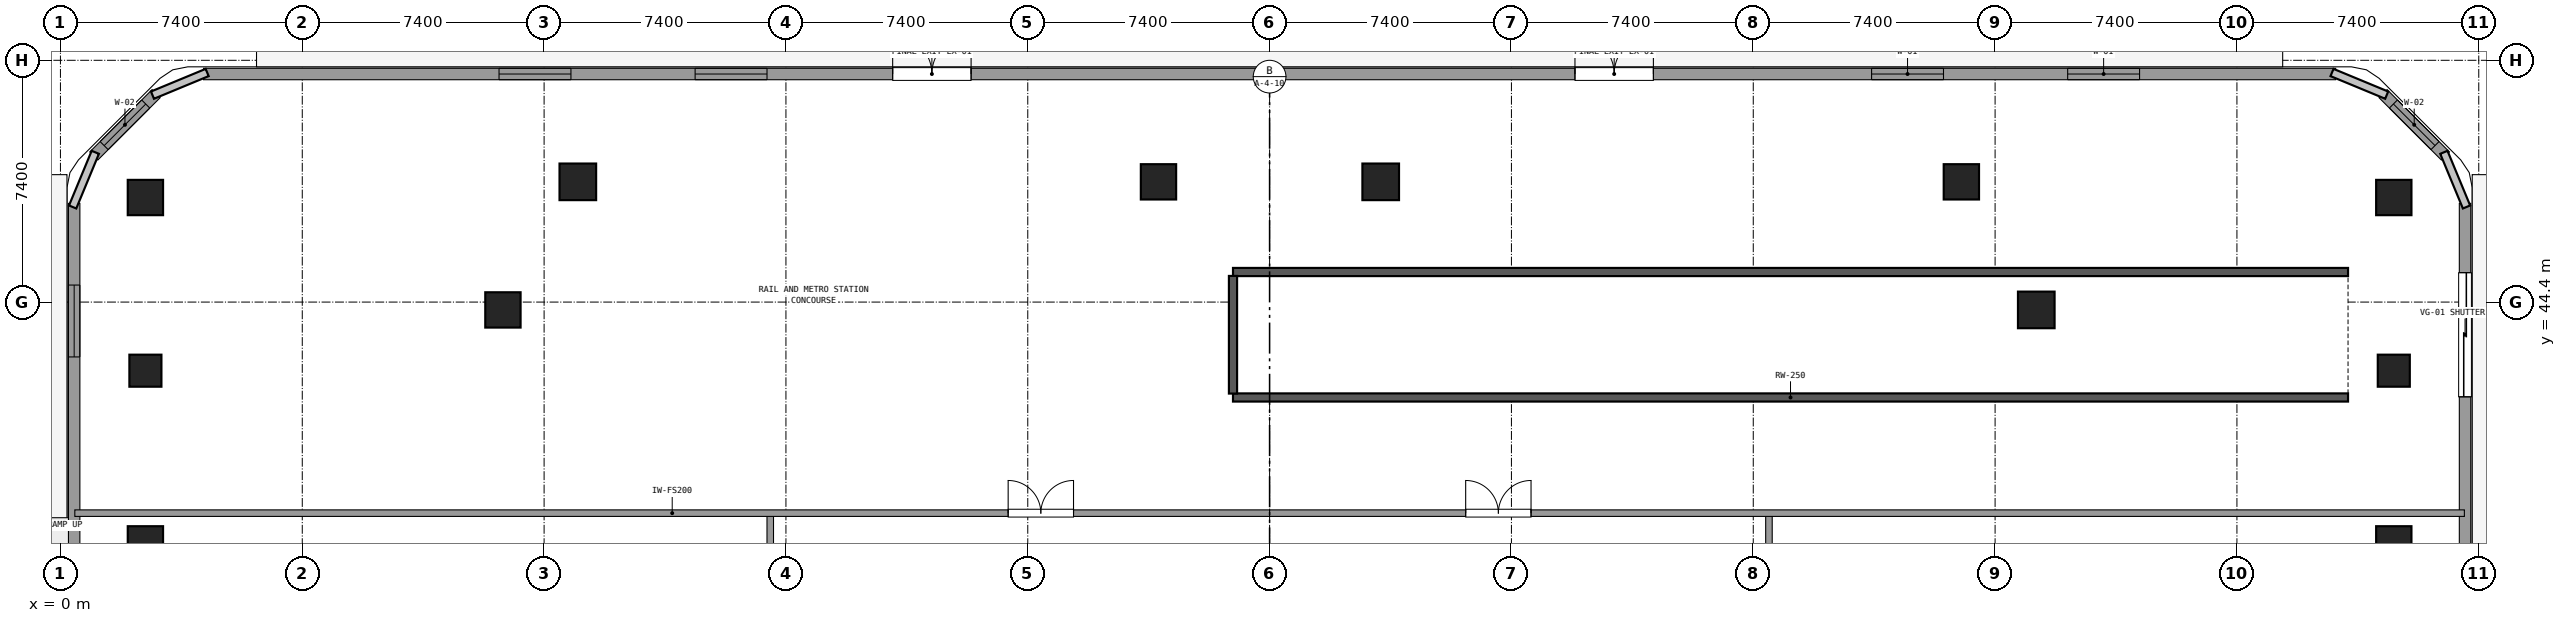
"""IFC4 building model, lengths in metres.
Left out: names, types, materials, properties, quantities, classifications, styles, units other than length and angle.
Written with IfcOpenShell. Run it as: python <this file> out.ifc"""

import sys

from ifc_helpers import new_model, si_unit, direction, frame, frame_2d, origin, origin_2d, place, context, subcontext, project, spatial, rectangle, circle, extrude, element, fill, save


model = new_model("IFC4")
c1 = context("Model", 3, precision=1e-05, world=origin(), true_north=direction((0.0, 1.0)))
c2 = subcontext(c1, "Body", "Model", "MODEL_VIEW")
j1 = project(units=[si_unit("LENGTHUNIT", "METRE"), si_unit("PLANEANGLEUNIT", "RADIAN")], contexts=[c1])
p1 = place(None, origin())
s1 = spatial("IfcSite", under=j1, at=p1, CompositionType="ELEMENT")
p2 = place(p1, origin())
s2 = spatial("IfcBuilding", under=s1, at=p2, CompositionType="ELEMENT")
p3 = place(p2, origin())
s3 = spatial("IfcBuildingStorey", under=s2, at=p3, CompositionType="ELEMENT", Elevation=0.0)
p4 = place(p3, frame((60.46, 44.16, 0.0), z_axis=(0.0, 0.0, 1.0), x_axis=(1.0, 0.0, 0.0)))
e1 = element("IfcColumn", 1, at=p4, inside=s3, PredefinedType="COLUMN", context=c2, shape_type="SweptSolid", body=[
    extrude(circle(Radius=0.56, at=origin_2d()), origin(), (0.0, 0.0, 1.0), 5.4),
])
p5 = place(p3, frame((58.168, 48.08, 0.0), z_axis=(0.0, 0.0, 1.0), x_axis=(1.0, 0.0, 0.0)))
e2 = element("IfcColumn", 2, at=p5, inside=s3, PredefinedType="COLUMN", context=c2, shape_type="SweptSolid", body=[
    extrude(rectangle(XDim=1.08, YDim=1.08, at=origin_2d()), origin(), (0.0, 0.0, 1.0), 5.4),
])
p6 = place(p3, frame((40.4, 48.08, 0.0), z_axis=(0.0, 0.0, 1.0), x_axis=(1.0, 0.0, 0.0)))
e3 = element("IfcColumn", 3, at=p6, inside=s3, PredefinedType="COLUMN", context=c2, shape_type="SweptSolid", body=[
    extrude(circle(Radius=0.56, at=origin_2d()), origin(), (0.0, 0.0, 1.0), 5.4),
])
p7 = place(p3, frame((33.6, 48.08, 0.0), z_axis=(0.0, 0.0, 1.0), x_axis=(1.0, 0.0, 0.0)))
e4 = element("IfcColumn", 4, at=p7, inside=s3, PredefinedType="COLUMN", context=c2, shape_type="SweptSolid", body=[
    extrude(rectangle(XDim=1.08, YDim=1.08, at=origin_2d()), origin(), (0.0, 0.0, 1.0), 5.4),
])
p8 = place(p3, frame((15.832, 48.08, 0.0), z_axis=(0.0, 0.0, 1.0), x_axis=(1.0, 0.0, 0.0)))
e5 = element("IfcColumn", 5, at=p8, inside=s3, PredefinedType="COLUMN", context=c2, shape_type="SweptSolid", body=[
    extrude(circle(Radius=0.56, at=origin_2d()), origin(), (0.0, 0.0, 1.0), 5.4),
])
for number, where, z_axis, x_axis in (
    (6, (13.54, 44.16, 0.0), (0.0, 0.0, 1.0), (1.0, 0.0, 0.0)),
    (7, (2.6, 37.0, 0.0), (0.0, 0.0, 1.0), (1.0, 0.0, 0.0)),
    (8, (2.6, 47.6, 0.0), (0.0, 0.0, 1.0), (1.0, 0.0, 0.0)),
    (9, (71.4, 37.0, 0.0), (0.0, 0.0, 1.0), (1.0, 0.0, 0.0)),
    (10, (71.4, 47.6, 0.0), (0.0, 0.0, 1.0), (1.0, 0.0, 0.0)),
):
    element("IfcColumn", number, at=place(p3, frame(where, z_axis=z_axis, x_axis=x_axis)), inside=s3, PredefinedType="COLUMN", context=c2, shape_type="SweptSolid", body=[
        extrude(rectangle(XDim=1.08, YDim=1.08, at=origin_2d()), origin(), (0.0, 0.0, 1.0), 5.4),
    ])
for number, where, z_axis, x_axis in (
    (11, (2.6, 42.3, 0.0), (0.0, 0.0, 1.0), (1.0, 0.0, 0.0)),
    (12, (71.4, 42.3, 0.0), (0.0, 0.0, 1.0), (1.0, 0.0, 0.0)),
):
    element("IfcColumn", number, at=place(p3, frame(where, z_axis=z_axis, x_axis=x_axis)), inside=s3, PredefinedType="PILASTER", context=c2, shape_type="SweptSolid", body=[
        extrude(circle(Radius=0.49, at=origin_2d()), origin(), (0.0, 0.0, 1.0), 5.4),
    ])
for number, where, z_axis, x_axis in (
    (13, (35.88, 41.48, 0.0), (0.0, 0.0, 1.0), (1.0, 0.0, 0.0)),
    (14, (35.88, 45.32, 0.0), (0.0, 0.0, 1.0), (1.0, 0.0, 0.0)),
):
    element("IfcWall", number, at=place(p3, frame(where, z_axis=z_axis, x_axis=x_axis)), inside=s3, PredefinedType="SOLIDWALL", context=c2, shape_type="SweptSolid", body=[
        extrude(rectangle(XDim=34.12, YDim=0.25, at=frame_2d((17.06, 0.0))), origin(), (0.0, 0.0, 1.0), 5.1),
    ])
p9 = place(p3, frame((35.88, 41.6, 0.0), z_axis=(0.0, 0.0, 1.0), x_axis=(0.0, 1.0, 0.0)))
e15 = element("IfcWall", 15, at=p9, inside=s3, PredefinedType="SOLIDWALL", context=c2, shape_type="SweptSolid", body=[
    extrude(rectangle(XDim=3.6, YDim=0.25, at=frame_2d((1.8, 0.0))), origin(), (0.0, 0.0, 1.0), 5.1),
])
p10 = place(p3, frame((73.58, 4.379, 0.0), z_axis=(0.0, 0.0, 1.0), x_axis=(0.0, 1.0, 0.0)))
e16 = element("IfcWall", 16, at=p10, inside=s3, PredefinedType="SOLIDWALL", context=c2, shape_type="SweptSolid", body=[
    extrude(rectangle(XDim=43.042, YDim=0.35, at=frame_2d((21.521, 0.0))), origin(), (0.0, 0.0, 1.0), 4.14),
])
p11 = place(p10, frame((14.071, 0.0, 0.0)))
e17 = element("IfcOpeningElement", 17, at=p11, cuts=e16, PredefinedType="OPENING", context=c2, shape_type="SweptSolid", body=[
    extrude(rectangle(XDim=2.1, YDim=2.4, at=frame_2d((1.05, 1.2))), frame((0.0, 0.185, 0.0), z_axis=(0.0, -1.0, 0.0), x_axis=(1.0, 0.0, 0.0)), (0.0, 0.0, 1.0), 0.37),
])
p12 = place(p10, frame((37.121, 0.0, 0.0)))
e18 = element("IfcOpeningElement", 18, at=p12, cuts=e16, PredefinedType="OPENING", context=c2, shape_type="SweptSolid", body=[
    extrude(rectangle(XDim=3.8, YDim=2.85, at=frame_2d((1.9, 1.425))), frame((0.0, 0.185, 0.0), z_axis=(0.0, -1.0, 0.0), x_axis=(1.0, 0.0, 0.0)), (0.0, 0.0, 1.0), 0.37),
])
p13 = place(p3, frame((72.979, 48.872, 0.0), z_axis=(0.0, 0.0, 1.0), x_axis=(-0.707106781187, 0.707106781187, 0.0)))
e19 = element("IfcWall", 19, at=p13, inside=s3, PredefinedType="SOLIDWALL", context=c2, shape_type="SweptSolid", body=[
    extrude(rectangle(XDim=2.697, YDim=0.35, at=frame_2d((1.348, 0.0))), origin(), (0.0, 0.0, 1.0), 4.14),
])
p14 = place(p13, frame((0.449, 0.0, 1.15)))
e20 = element("IfcOpeningElement", 20, at=p14, cuts=e19, PredefinedType="OPENING", context=c2, shape_type="SweptSolid", body=[
    extrude(rectangle(XDim=1.8, YDim=1.75, at=frame_2d((0.9, 0.875))), frame((0.0, 0.185, 0.0), z_axis=(0.0, -1.0, 0.0), x_axis=(1.0, 0.0, 0.0)), (0.0, 0.0, 1.0), 0.37),
])
p15 = place(p3, frame((69.621, 51.38, 0.0), z_axis=(0.0, 0.0, 1.0), x_axis=(-1.0, 0.0, 0.0)))
e21 = element("IfcWall", 21, at=p15, inside=s3, PredefinedType="SOLIDWALL", context=c2, shape_type="SweptSolid", body=[
    extrude(rectangle(XDim=65.242, YDim=0.35, at=frame_2d((32.621, 0.0))), origin(), (0.0, 0.0, 1.0), 4.14),
])
p16 = place(p15, frame((20.877, 0.0, 0.0)))
e22 = element("IfcOpeningElement", 22, at=p16, cuts=e21, PredefinedType="OPENING", context=c2, shape_type="SweptSolid", body=[
    extrude(rectangle(XDim=2.4, YDim=2.5, at=frame_2d((1.2, 1.25))), frame((0.0, 0.185, 0.0), z_axis=(0.0, -1.0, 0.0), x_axis=(1.0, 0.0, 0.0)), (0.0, 0.0, 1.0), 0.37),
])
p17 = place(p15, frame((41.755, 0.0, 0.0)))
e23 = element("IfcOpeningElement", 23, at=p17, cuts=e21, PredefinedType="OPENING", context=c2, shape_type="SweptSolid", body=[
    extrude(rectangle(XDim=2.4, YDim=2.5, at=frame_2d((1.2, 1.25))), frame((0.0, 0.185, 0.0), z_axis=(0.0, -1.0, 0.0), x_axis=(1.0, 0.0, 0.0)), (0.0, 0.0, 1.0), 0.37),
])
p18 = place(p15, frame((6.0, 0.0, 1.2)))
e24 = element("IfcOpeningElement", 24, at=p18, cuts=e21, PredefinedType="OPENING", context=c2, shape_type="SweptSolid", body=[
    extrude(rectangle(XDim=2.2, YDim=1.6, at=frame_2d((1.1, 0.8))), frame((0.0, 0.185, 0.0), z_axis=(0.0, -1.0, 0.0), x_axis=(1.0, 0.0, 0.0)), (0.0, 0.0, 1.0), 0.37),
])
p19 = place(p15, frame((12.0, 0.0, 1.2)))
e25 = element("IfcOpeningElement", 25, at=p19, cuts=e21, PredefinedType="OPENING", context=c2, shape_type="SweptSolid", body=[
    extrude(rectangle(XDim=2.2, YDim=1.6, at=frame_2d((1.1, 0.8))), frame((0.0, 0.185, 0.0), z_axis=(0.0, -1.0, 0.0), x_axis=(1.0, 0.0, 0.0)), (0.0, 0.0, 1.0), 0.37),
])
p20 = place(p15, frame((48.0, 0.0, 1.2)))
e26 = element("IfcOpeningElement", 26, at=p20, cuts=e21, PredefinedType="OPENING", context=c2, shape_type="SweptSolid", body=[
    extrude(rectangle(XDim=2.2, YDim=1.6, at=frame_2d((1.1, 0.8))), frame((0.0, 0.185, 0.0), z_axis=(0.0, -1.0, 0.0), x_axis=(1.0, 0.0, 0.0)), (0.0, 0.0, 1.0), 0.37),
])
p21 = place(p15, frame((54.0, 0.0, 1.2)))
e27 = element("IfcOpeningElement", 27, at=p21, cuts=e21, PredefinedType="OPENING", context=c2, shape_type="SweptSolid", body=[
    extrude(rectangle(XDim=2.2, YDim=1.6, at=frame_2d((1.1, 0.8))), frame((0.0, 0.185, 0.0), z_axis=(0.0, -1.0, 0.0), x_axis=(1.0, 0.0, 0.0)), (0.0, 0.0, 1.0), 0.37),
])
p22 = place(p3, frame((2.928, 50.779, 0.0), z_axis=(0.0, 0.0, 1.0), x_axis=(-0.707106781187, -0.707106781187, 0.0)))
e28 = element("IfcWall", 28, at=p22, inside=s3, PredefinedType="SOLIDWALL", context=c2, shape_type="SweptSolid", body=[
    extrude(rectangle(XDim=2.697, YDim=0.35, at=frame_2d((1.348, 0.0))), origin(), (0.0, 0.0, 1.0), 4.14),
])
p23 = place(p22, frame((0.449, 0.0, 1.15)))
e29 = element("IfcOpeningElement", 29, at=p23, cuts=e28, PredefinedType="OPENING", context=c2, shape_type="SweptSolid", body=[
    extrude(rectangle(XDim=1.8, YDim=1.75, at=frame_2d((0.9, 0.875))), frame((0.0, 0.185, 0.0), z_axis=(0.0, -1.0, 0.0), x_axis=(1.0, 0.0, 0.0)), (0.0, 0.0, 1.0), 0.37),
])
p24 = place(p3, frame((0.42, 47.421, 0.0), z_axis=(0.0, 0.0, 1.0), x_axis=(0.0, -1.0, 0.0)))
e30 = element("IfcWall", 30, at=p24, inside=s3, PredefinedType="SOLIDWALL", context=c2, shape_type="SweptSolid", body=[
    extrude(rectangle(XDim=43.042, YDim=0.35, at=frame_2d((21.521, 0.0))), origin(), (0.0, 0.0, 1.0), 4.14),
])
p25 = place(p24, frame((26.871, 0.0, 0.0)))
e31 = element("IfcOpeningElement", 31, at=p25, cuts=e30, PredefinedType="OPENING", context=c2, shape_type="SweptSolid", body=[
    extrude(rectangle(XDim=2.4, YDim=2.5, at=frame_2d((1.2, 1.25))), frame((0.0, 0.185, 0.0), z_axis=(0.0, -1.0, 0.0), x_axis=(1.0, 0.0, 0.0)), (0.0, 0.0, 1.0), 0.37),
])
p26 = place(p24, frame((2.5, 0.0, 1.2)))
e32 = element("IfcOpeningElement", 32, at=p26, cuts=e30, PredefinedType="OPENING", context=c2, shape_type="SweptSolid", body=[
    extrude(rectangle(XDim=2.2, YDim=1.6, at=frame_2d((1.1, 0.8))), frame((0.0, 0.185, 0.0), z_axis=(0.0, -1.0, 0.0), x_axis=(1.0, 0.0, 0.0)), (0.0, 0.0, 1.0), 0.37),
])
p27 = place(p3, frame((21.72, 30.7, 0.0), z_axis=(0.0, 0.0, 1.0), x_axis=(0.0, 1.0, 0.0)))
e33 = element("IfcWall", 33, at=p27, inside=s3, PredefinedType="SOLIDWALL", context=c2, shape_type="SweptSolid", body=[
    extrude(rectangle(XDim=7.24, YDim=0.2, at=frame_2d((3.62, 0.0))), origin(), (0.0, 0.0, 1.0), 4.11),
])
p28 = place(p27, frame((2.6, 0.0, 0.0)))
e34 = element("IfcOpeningElement", 34, at=p28, cuts=e33, PredefinedType="OPENING", context=c2, shape_type="SweptSolid", body=[
    extrude(rectangle(XDim=1.6, YDim=2.2, at=frame_2d((0.8, 1.1))), frame((0.0, 0.11, 0.0), z_axis=(0.0, -1.0, 0.0), x_axis=(1.0, 0.0, 0.0)), (0.0, 0.0, 1.0), 0.22),
])
p29 = place(p3, frame((52.28, 30.7, 0.0), z_axis=(0.0, 0.0, 1.0), x_axis=(0.0, 1.0, 0.0)))
e35 = element("IfcWall", 35, at=p29, inside=s3, PredefinedType="SOLIDWALL", context=c2, shape_type="SweptSolid", body=[
    extrude(rectangle(XDim=7.24, YDim=0.2, at=frame_2d((3.62, 0.0))), origin(), (0.0, 0.0, 1.0), 4.11),
])
p30 = place(p29, frame((1.4, 0.0, 0.0)))
e36 = element("IfcOpeningElement", 36, at=p30, cuts=e35, PredefinedType="OPENING", context=c2, shape_type="SweptSolid", body=[
    extrude(rectangle(XDim=1.6, YDim=2.2, at=frame_2d((0.8, 1.1))), frame((0.0, 0.11, 0.0), z_axis=(0.0, -1.0, 0.0), x_axis=(1.0, 0.0, 0.0)), (0.0, 0.0, 1.0), 0.22),
])
p31 = place(p3, frame((0.44, 37.94, 0.0), z_axis=(0.0, 0.0, 1.0), x_axis=(1.0, 0.0, 0.0)))
e37 = element("IfcWall", 37, at=p31, inside=s3, PredefinedType="SOLIDWALL", context=c2, shape_type="SweptSolid", body=[
    extrude(rectangle(XDim=36.56, YDim=0.2, at=frame_2d((18.28, 0.0))), origin(), (0.0, 0.0, 1.0), 4.11),
])
p32 = place(p31, frame((28.56, 0.0, 0.0)))
e38 = element("IfcOpeningElement", 38, at=p32, cuts=e37, PredefinedType="OPENING", context=c2, shape_type="SweptSolid", body=[
    extrude(rectangle(XDim=2.0, YDim=2.2, at=frame_2d((1.0, 1.1))), frame((0.0, 0.11, 0.0), z_axis=(0.0, -1.0, 0.0), x_axis=(1.0, 0.0, 0.0)), (0.0, 0.0, 1.0), 0.22),
])
p33 = place(p3, frame((37.0, 37.94, 0.0), z_axis=(0.0, 0.0, 1.0), x_axis=(1.0, 0.0, 0.0)))
e39 = element("IfcWall", 39, at=p33, inside=s3, PredefinedType="SOLIDWALL", context=c2, shape_type="SweptSolid", body=[
    extrude(rectangle(XDim=36.56, YDim=0.2, at=frame_2d((18.28, 0.0))), origin(), (0.0, 0.0, 1.0), 4.11),
])
p34 = place(p33, frame((6.0, 0.0, 0.0)))
e40 = element("IfcOpeningElement", 40, at=p34, cuts=e39, PredefinedType="OPENING", context=c2, shape_type="SweptSolid", body=[
    extrude(rectangle(XDim=2.0, YDim=2.2, at=frame_2d((1.0, 1.1))), frame((0.0, 0.11, 0.0), z_axis=(0.0, -1.0, 0.0), x_axis=(1.0, 0.0, 0.0)), (0.0, 0.0, 1.0), 0.22),
])
p35 = place(p12, origin())
e41 = element("IfcDoor", 41, at=p35, inside=s3, OperationType="ROLLINGUP", PredefinedType="GATE", context=c2, shape_type="SweptSolid", body=[
    extrude(rectangle(XDim=3.8, YDim=2.85, at=frame_2d((1.9, 1.425))), frame((0.0, 0.025, 0.0), z_axis=(0.0, -1.0, 0.0), x_axis=(1.0, 0.0, 0.0)), (0.0, 0.0, 1.0), 0.05),
])
fill(e18, e41)
p36 = place(p14, origin())
e42 = element("IfcWindow", 42, at=p36, inside=s3, PartitioningType="SINGLE_PANEL", PredefinedType="WINDOW", context=c2, shape_type="SweptSolid", body=[
    extrude(rectangle(XDim=1.8, YDim=1.75, at=frame_2d((0.9, 0.875))), frame((0.0, 0.03, 0.0), z_axis=(0.0, -1.0, 0.0), x_axis=(1.0, 0.0, 0.0)), (0.0, 0.0, 1.0), 0.06),
])
fill(e20, e42)
p37 = place(p16, frame((2.4, 0.0, 0.0), z_axis=(0.0, 0.0, 1.0), x_axis=(-1.0, 0.0, 0.0)))
e43 = element("IfcDoor", 43, at=p37, inside=s3, OperationType="DOUBLE_DOOR_SINGLE_SWING", PredefinedType="DOOR", context=c2, shape_type="SweptSolid", body=[
    extrude(rectangle(XDim=2.4, YDim=2.5, at=frame_2d((1.2, 1.25))), frame((0.0, 0.025, 0.0), z_axis=(0.0, -1.0, 0.0), x_axis=(1.0, 0.0, 0.0)), (0.0, 0.0, 1.0), 0.05),
])
fill(e22, e43)
p38 = place(p17, frame((2.4, 0.0, 0.0), z_axis=(0.0, 0.0, 1.0), x_axis=(-1.0, 0.0, 0.0)))
e44 = element("IfcDoor", 44, at=p38, inside=s3, OperationType="DOUBLE_DOOR_SINGLE_SWING", PredefinedType="DOOR", context=c2, shape_type="SweptSolid", body=[
    extrude(rectangle(XDim=2.4, YDim=2.5, at=frame_2d((1.2, 1.25))), frame((0.0, 0.025, 0.0), z_axis=(0.0, -1.0, 0.0), x_axis=(1.0, 0.0, 0.0)), (0.0, 0.0, 1.0), 0.05),
])
fill(e23, e44)
p39 = place(p18, origin())
e45 = element("IfcWindow", 45, at=p39, inside=s3, PartitioningType="SINGLE_PANEL", PredefinedType="WINDOW", context=c2, shape_type="SweptSolid", body=[
    extrude(rectangle(XDim=2.2, YDim=1.6, at=frame_2d((1.1, 0.8))), frame((0.0, 0.03, 0.0), z_axis=(0.0, -1.0, 0.0), x_axis=(1.0, 0.0, 0.0)), (0.0, 0.0, 1.0), 0.06),
])
fill(e24, e45)
p40 = place(p19, origin())
e46 = element("IfcWindow", 46, at=p40, inside=s3, PartitioningType="SINGLE_PANEL", PredefinedType="WINDOW", context=c2, shape_type="SweptSolid", body=[
    extrude(rectangle(XDim=2.2, YDim=1.6, at=frame_2d((1.1, 0.8))), frame((0.0, 0.03, 0.0), z_axis=(0.0, -1.0, 0.0), x_axis=(1.0, 0.0, 0.0)), (0.0, 0.0, 1.0), 0.06),
])
fill(e25, e46)
p41 = place(p20, origin())
e47 = element("IfcWindow", 47, at=p41, inside=s3, PartitioningType="SINGLE_PANEL", PredefinedType="WINDOW", context=c2, shape_type="SweptSolid", body=[
    extrude(rectangle(XDim=2.2, YDim=1.6, at=frame_2d((1.1, 0.8))), frame((0.0, 0.03, 0.0), z_axis=(0.0, -1.0, 0.0), x_axis=(1.0, 0.0, 0.0)), (0.0, 0.0, 1.0), 0.06),
])
fill(e26, e47)
p42 = place(p21, origin())
e48 = element("IfcWindow", 48, at=p42, inside=s3, PartitioningType="SINGLE_PANEL", PredefinedType="WINDOW", context=c2, shape_type="SweptSolid", body=[
    extrude(rectangle(XDim=2.2, YDim=1.6, at=frame_2d((1.1, 0.8))), frame((0.0, 0.03, 0.0), z_axis=(0.0, -1.0, 0.0), x_axis=(1.0, 0.0, 0.0)), (0.0, 0.0, 1.0), 0.06),
])
fill(e27, e48)
p43 = place(p23, origin())
e49 = element("IfcWindow", 49, at=p43, inside=s3, PartitioningType="SINGLE_PANEL", PredefinedType="WINDOW", context=c2, shape_type="SweptSolid", body=[
    extrude(rectangle(XDim=1.8, YDim=1.75, at=frame_2d((0.9, 0.875))), frame((0.0, 0.03, 0.0), z_axis=(0.0, -1.0, 0.0), x_axis=(1.0, 0.0, 0.0)), (0.0, 0.0, 1.0), 0.06),
])
fill(e29, e49)
p44 = place(p26, origin())
e50 = element("IfcWindow", 50, at=p44, inside=s3, PartitioningType="SINGLE_PANEL", PredefinedType="WINDOW", context=c2, shape_type="SweptSolid", body=[
    extrude(rectangle(XDim=2.2, YDim=1.6, at=frame_2d((1.1, 0.8))), frame((0.0, 0.03, 0.0), z_axis=(0.0, -1.0, 0.0), x_axis=(1.0, 0.0, 0.0)), (0.0, 0.0, 1.0), 0.06),
])
fill(e32, e50)
p45 = place(p32, origin())
e51 = element("IfcDoor", 51, at=p45, inside=s3, OperationType="DOUBLE_DOOR_SINGLE_SWING", PredefinedType="DOOR", context=c2, shape_type="SweptSolid", body=[
    extrude(rectangle(XDim=2.0, YDim=2.2, at=frame_2d((1.0, 1.1))), frame((0.0, 0.025, 0.0), z_axis=(0.0, -1.0, 0.0), x_axis=(1.0, 0.0, 0.0)), (0.0, 0.0, 1.0), 0.05),
])
fill(e38, e51)
p46 = place(p34, origin())
e52 = element("IfcDoor", 52, at=p46, inside=s3, OperationType="DOUBLE_DOOR_SINGLE_SWING", PredefinedType="DOOR", context=c2, shape_type="SweptSolid", body=[
    extrude(rectangle(XDim=2.0, YDim=2.2, at=frame_2d((1.0, 1.1))), frame((0.0, 0.025, 0.0), z_axis=(0.0, -1.0, 0.0), x_axis=(1.0, 0.0, 0.0)), (0.0, 0.0, 1.0), 0.05),
])
fill(e40, e52)
save(model, sys.argv[1])
